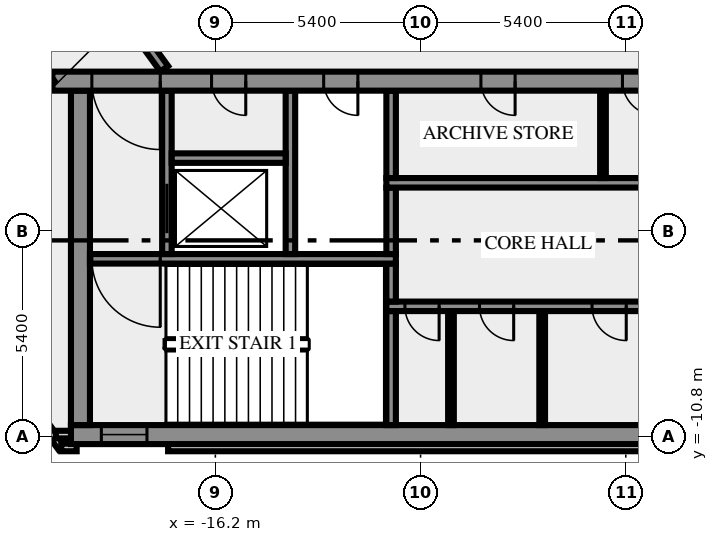
"""IFC4 building model, lengths in metres.
Left out: names, types, materials, properties, quantities, classifications, styles, units other than length and angle.
Written with IfcOpenShell. Run it as: python <this file> out.ifc"""

import sys

from ifc_helpers import new_model, si_unit, direction, frame, frame_2d, origin, place, context, subcontext, project, spatial, rectangle, extrude, element, fill, save


model = new_model("IFC4")
c1 = context("Model", 3, precision=1e-05, world=origin(), true_north=direction((0.0, 1.0)))
c2 = subcontext(c1, "Body", "Model", "MODEL_VIEW")
j1 = project(units=[si_unit("LENGTHUNIT", "METRE"), si_unit("PLANEANGLEUNIT", "RADIAN")], contexts=[c1])
p1 = place(None, origin())
s1 = spatial("IfcSite", under=j1, at=p1, CompositionType="ELEMENT")
p2 = place(p1, origin())
s2 = spatial("IfcBuilding", under=s1, at=p2, CompositionType="ELEMENT")
p3 = place(p2, frame((0.0, 0.0, 156.0)))
s3 = spatial("IfcBuildingStorey", under=s2, at=p3, CompositionType="ELEMENT", Elevation=156.0)
p4 = place(p3, frame((-21.833, -8.909, 0.0), z_axis=(0.0, 0.0, 1.0), x_axis=(0.587766567315, -0.809030569476, 0.0)))
e1 = element("IfcWall", 1, at=p4, inside=s3, PredefinedType="SOLIDWALL", context=c2, shape_type="SweptSolid", body=[
    extrude(rectangle(XDim=2.688, YDim=0.2, at=frame_2d((1.344, 0.0))), origin(), (0.0, 0.0, 1.0), 3.65),
])
p5 = place(p3, frame((-20.256, -11.088, 0.0), z_axis=(0.0, 0.0, 1.0), x_axis=(1.0, 0.0, 0.0)))
e2 = element("IfcWall", 2, at=p5, inside=s3, PredefinedType="SOLIDWALL", context=c2, shape_type="SweptSolid", body=[
    extrude(rectangle(XDim=0.406, YDim=0.2, at=frame_2d((0.203, 0.0))), origin(), (0.0, 0.0, 1.0), 3.65),
])
p6 = place(p3, frame((-17.444, -11.088, 0.0), z_axis=(0.0, 0.0, 1.0), x_axis=(1.0, 0.0, 0.0)))
e3 = element("IfcWall", 3, at=p6, inside=s3, PredefinedType="SOLIDWALL", context=c2, shape_type="SweptSolid", body=[
    extrude(rectangle(XDim=34.888, YDim=0.2, at=frame_2d((17.444, 0.0))), origin(), (0.0, 0.0, 1.0), 3.65),
])
p7 = place(p3, frame((-19.98, -10.75, 0.0), z_axis=(0.0, 0.0, 1.0), x_axis=(-1.0, 0.0, 0.0)))
e4 = element("IfcWall", 4, at=p7, inside=s3, PredefinedType="SOLIDWALL", context=c2, shape_type="SweptSolid", body=[
    extrude(rectangle(XDim=0.417, YDim=0.2, at=frame_2d((0.208, 0.0))), origin(), (0.0, 0.0, 1.0), 3.65),
])
p8 = place(p3, frame((-20.0, -10.75, 0.0), z_axis=(0.0, 0.0, 1.0), x_axis=(1.0, 0.0, 0.0)))
e5 = element("IfcWall", 5, at=p8, inside=s3, PredefinedType="SHEAR", context=c2, shape_type="SweptSolid", body=[
    extrude(rectangle(XDim=40.0, YDim=0.5, at=frame_2d((20.0, 0.0))), origin(), (0.0, 0.0, 1.0), 3.65),
])
p9 = place(p8, frame((0.8, 0.0, 1.0)))
e6 = element("IfcOpeningElement", 6, at=p9, cuts=e5, PredefinedType="OPENING", context=c2, shape_type="SweptSolid", body=[
    extrude(rectangle(XDim=1.2, YDim=1.2, at=frame_2d((0.6, 0.6))), frame((0.0, 0.26, 0.0), z_axis=(0.0, -1.0, 0.0), x_axis=(1.0, 0.0, 0.0)), (0.0, 0.0, 1.0), 0.52),
])
p10 = place(p8, frame((38.0, 0.0, 1.0)))
e7 = element("IfcOpeningElement", 7, at=p10, cuts=e5, PredefinedType="OPENING", context=c2, shape_type="SweptSolid", body=[
    extrude(rectangle(XDim=1.2, YDim=1.2, at=frame_2d((0.6, 0.6))), frame((0.0, 0.26, 0.0), z_axis=(0.0, -1.0, 0.0), x_axis=(1.0, 0.0, 0.0)), (0.0, 0.0, 1.0), 0.52),
])
p11 = place(p3, frame((-19.75, -10.5, 0.0), z_axis=(0.0, 0.0, 1.0), x_axis=(0.0, 1.0, 0.0)))
e8 = element("IfcWall", 8, at=p11, inside=s3, PredefinedType="SHEAR", context=c2, shape_type="SweptSolid", body=[
    extrude(rectangle(XDim=8.8, YDim=0.5, at=frame_2d((4.4, 0.0))), origin(), (0.0, 0.0, 1.0), 3.65),
])
p12 = place(p3, frame((-11.575, -10.5, 0.0), z_axis=(0.0, 0.0, 1.0), x_axis=(0.0, 1.0, 0.0)))
e9 = element("IfcWall", 9, at=p12, inside=s3, PredefinedType="SHEAR", context=c2, shape_type="SweptSolid", body=[
    extrude(rectangle(XDim=3.0, YDim=0.25, at=frame_2d((1.5, 0.0))), origin(), (0.0, 0.0, 1.0), 3.65),
])
for number, where, z_axis, x_axis in (
    (10, (-10.0, -10.5, 0.0), (0.0, 0.0, 1.0), (0.0, 1.0, 0.0)),
    (11, (-7.6, -10.5, 0.0), (0.0, 0.0, 1.0), (0.0, 1.0, 0.0)),
):
    element("IfcWall", number, at=place(p3, frame(where, z_axis=z_axis, x_axis=x_axis)), inside=s3, PredefinedType="PARTITIONING", context=c2, shape_type="SweptSolid", body=[
        extrude(rectangle(XDim=3.0, YDim=0.15, at=frame_2d((1.5, 0.0))), origin(), (0.0, 0.0, 1.0), 3.65),
    ])
p13 = place(p3, frame((11.7, -7.375, 0.0), z_axis=(0.0, 0.0, 1.0), x_axis=(-1.0, 0.0, 0.0)))
e12 = element("IfcWall", 12, at=p13, inside=s3, PredefinedType="SHEAR", context=c2, shape_type="SweptSolid", body=[
    extrude(rectangle(XDim=23.4, YDim=0.25, at=frame_2d((11.7, 0.0))), origin(), (0.0, 0.0, 1.0), 3.65),
])
p14 = place(p13, frame((22.012, 0.0, 0.0)))
e13 = element("IfcOpeningElement", 13, at=p14, cuts=e12, PredefinedType="OPENING", context=c2, shape_type="SweptSolid", body=[
    extrude(rectangle(XDim=0.9, YDim=2.1, at=frame_2d((0.45, 1.05))), frame((0.0, 0.135, 0.0), z_axis=(0.0, -1.0, 0.0), x_axis=(1.0, 0.0, 0.0)), (0.0, 0.0, 1.0), 0.27),
])
p15 = place(p13, frame((20.05, 0.0, 0.0)))
e14 = element("IfcOpeningElement", 14, at=p15, cuts=e12, PredefinedType="OPENING", context=c2, shape_type="SweptSolid", body=[
    extrude(rectangle(XDim=0.9, YDim=2.1, at=frame_2d((0.45, 1.05))), frame((0.0, 0.135, 0.0), z_axis=(0.0, -1.0, 0.0), x_axis=(1.0, 0.0, 0.0)), (0.0, 0.0, 1.0), 0.27),
])
p16 = place(p13, frame((17.088, 0.0, 0.0)))
e15 = element("IfcOpeningElement", 15, at=p16, cuts=e12, PredefinedType="OPENING", context=c2, shape_type="SweptSolid", body=[
    extrude(rectangle(XDim=0.9, YDim=2.1, at=frame_2d((0.45, 1.05))), frame((0.0, 0.135, 0.0), z_axis=(0.0, -1.0, 0.0), x_axis=(1.0, 0.0, 0.0)), (0.0, 0.0, 1.0), 0.27),
])
p17 = place(p13, frame((14.45, 0.0, 0.0)))
e16 = element("IfcOpeningElement", 16, at=p17, cuts=e12, PredefinedType="OPENING", context=c2, shape_type="SweptSolid", body=[
    extrude(rectangle(XDim=0.9, YDim=2.1, at=frame_2d((0.45, 1.05))), frame((0.0, 0.135, 0.0), z_axis=(0.0, -1.0, 0.0), x_axis=(1.0, 0.0, 0.0)), (0.0, 0.0, 1.0), 0.27),
])
p18 = place(p13, frame((12.95, 0.0, 0.0)))
e17 = element("IfcOpeningElement", 17, at=p18, cuts=e12, PredefinedType="OPENING", context=c2, shape_type="SweptSolid", body=[
    extrude(rectangle(XDim=0.9, YDim=2.1, at=frame_2d((0.45, 1.05))), frame((0.0, 0.135, 0.0), z_axis=(0.0, -1.0, 0.0), x_axis=(1.0, 0.0, 0.0)), (0.0, 0.0, 1.0), 0.27),
])
p19 = place(p13, frame((11.475, 0.0, 0.0)))
e18 = element("IfcOpeningElement", 18, at=p19, cuts=e12, PredefinedType="OPENING", context=c2, shape_type="SweptSolid", body=[
    extrude(rectangle(XDim=0.9, YDim=2.1, at=frame_2d((0.45, 1.05))), frame((0.0, 0.135, 0.0), z_axis=(0.0, -1.0, 0.0), x_axis=(1.0, 0.0, 0.0)), (0.0, 0.0, 1.0), 0.27),
])
p20 = place(p13, frame((10.45, 0.0, 0.0)))
e19 = element("IfcOpeningElement", 19, at=p20, cuts=e12, PredefinedType="OPENING", context=c2, shape_type="SweptSolid", body=[
    extrude(rectangle(XDim=0.5, YDim=2.1, at=frame_2d((0.25, 1.05))), frame((0.0, 0.135, 0.0), z_axis=(0.0, -1.0, 0.0), x_axis=(1.0, 0.0, 0.0)), (0.0, 0.0, 1.0), 0.27),
])
p21 = place(p13, frame((8.35, 0.0, 0.0)))
e20 = element("IfcOpeningElement", 20, at=p21, cuts=e12, PredefinedType="OPENING", context=c2, shape_type="SweptSolid", body=[
    extrude(rectangle(XDim=1.1, YDim=2.1, at=frame_2d((0.55, 1.05))), frame((0.0, 0.135, 0.0), z_axis=(0.0, -1.0, 0.0), x_axis=(1.0, 0.0, 0.0)), (0.0, 0.0, 1.0), 0.27),
])
p22 = place(p13, frame((5.85, 0.0, 0.0)))
e21 = element("IfcOpeningElement", 21, at=p22, cuts=e12, PredefinedType="OPENING", context=c2, shape_type="SweptSolid", body=[
    extrude(rectangle(XDim=1.1, YDim=2.1, at=frame_2d((0.55, 1.05))), frame((0.0, 0.135, 0.0), z_axis=(0.0, -1.0, 0.0), x_axis=(1.0, 0.0, 0.0)), (0.0, 0.0, 1.0), 0.27),
])
p23 = place(p13, frame((3.35, 0.0, 0.0)))
e22 = element("IfcOpeningElement", 22, at=p23, cuts=e12, PredefinedType="OPENING", context=c2, shape_type="SweptSolid", body=[
    extrude(rectangle(XDim=1.1, YDim=2.1, at=frame_2d((0.55, 1.05))), frame((0.0, 0.135, 0.0), z_axis=(0.0, -1.0, 0.0), x_axis=(1.0, 0.0, 0.0)), (0.0, 0.0, 1.0), 0.27),
])
p24 = place(p13, frame((0.85, 0.0, 0.0)))
e23 = element("IfcOpeningElement", 23, at=p24, cuts=e12, PredefinedType="OPENING", context=c2, shape_type="SweptSolid", body=[
    extrude(rectangle(XDim=1.1, YDim=2.1, at=frame_2d((0.55, 1.05))), frame((0.0, 0.135, 0.0), z_axis=(0.0, -1.0, 0.0), x_axis=(1.0, 0.0, 0.0)), (0.0, 0.0, 1.0), 0.27),
])
p25 = place(p3, frame((-11.575, -7.25, 0.0), z_axis=(0.0, 0.0, 1.0), x_axis=(0.0, 1.0, 0.0)))
e24 = element("IfcWall", 24, at=p25, inside=s3, PredefinedType="SHEAR", context=c2, shape_type="SweptSolid", body=[
    extrude(rectangle(XDim=1.0, YDim=0.25, at=frame_2d((0.5, 0.0))), origin(), (0.0, 0.0, 1.0), 3.65),
])
p26 = place(p3, frame((-11.45, -6.125, 0.0), z_axis=(0.0, 0.0, 1.0), x_axis=(-1.0, 0.0, 0.0)))
e25 = element("IfcWall", 25, at=p26, inside=s3, PredefinedType="SHEAR", context=c2, shape_type="SweptSolid", body=[
    extrude(rectangle(XDim=8.05, YDim=0.25, at=frame_2d((4.025, 0.0))), origin(), (0.0, 0.0, 1.0), 3.65),
])
p27 = place(p26, frame((6.2, 0.0, 0.0)))
e26 = element("IfcOpeningElement", 26, at=p27, cuts=e25, PredefinedType="OPENING", context=c2, shape_type="SweptSolid", body=[
    extrude(rectangle(XDim=1.8, YDim=2.1, at=frame_2d((0.9, 1.05))), frame((0.0, 0.135, 0.0), z_axis=(0.0, -1.0, 0.0), x_axis=(1.0, 0.0, 0.0)), (0.0, 0.0, 1.0), 0.27),
])
p28 = place(p3, frame((-17.475, -6.0, 0.0), z_axis=(0.0, 0.0, 1.0), x_axis=(0.0, 1.0, 0.0)))
e27 = element("IfcWall", 27, at=p28, inside=s3, PredefinedType="SHEAR", context=c2, shape_type="SweptSolid", body=[
    extrude(rectangle(XDim=4.3, YDim=0.25, at=frame_2d((2.15, 0.0))), origin(), (0.0, 0.0, 1.0), 3.65),
])
p29 = place(p28, frame((0.55, 0.0, 0.0)))
e28 = element("IfcOpeningElement", 28, at=p29, cuts=e27, PredefinedType="OPENING", context=c2, shape_type="SweptSolid", body=[
    extrude(rectangle(XDim=1.3, YDim=2.1, at=frame_2d((0.65, 1.05))), frame((0.0, 0.135, 0.0), z_axis=(0.0, -1.0, 0.0), x_axis=(1.0, 0.0, 0.0)), (0.0, 0.0, 1.0), 0.27),
])
p30 = place(p3, frame((-14.225, -6.0, 0.0), z_axis=(0.0, 0.0, 1.0), x_axis=(0.0, 1.0, 0.0)))
e29 = element("IfcWall", 29, at=p30, inside=s3, PredefinedType="SHEAR", context=c2, shape_type="SweptSolid", body=[
    extrude(rectangle(XDim=4.3, YDim=0.25, at=frame_2d((2.15, 0.0))), origin(), (0.0, 0.0, 1.0), 3.65),
])
p31 = place(p3, frame((-11.575, -6.0, 0.0), z_axis=(0.0, 0.0, 1.0), x_axis=(0.0, 1.0, 0.0)))
e30 = element("IfcWall", 30, at=p31, inside=s3, PredefinedType="SHEAR", context=c2, shape_type="SweptSolid", body=[
    extrude(rectangle(XDim=1.75, YDim=0.25, at=frame_2d((0.875, 0.0))), origin(), (0.0, 0.0, 1.0), 3.65),
])
p32 = place(p3, frame((-11.7, -4.125, 0.0), z_axis=(0.0, 0.0, 1.0), x_axis=(1.0, 0.0, 0.0)))
e31 = element("IfcWall", 31, at=p32, inside=s3, PredefinedType="SHEAR", context=c2, shape_type="SweptSolid", body=[
    extrude(rectangle(XDim=7.75, YDim=0.25, at=frame_2d((3.875, 0.0))), origin(), (0.0, 0.0, 1.0), 3.65),
])
p33 = place(p3, frame((-11.575, -4.0, 0.0), z_axis=(0.0, 0.0, 1.0), x_axis=(0.0, 1.0, 0.0)))
e32 = element("IfcWall", 32, at=p33, inside=s3, PredefinedType="SHEAR", context=c2, shape_type="SweptSolid", body=[
    extrude(rectangle(XDim=2.3, YDim=0.25, at=frame_2d((1.15, 0.0))), origin(), (0.0, 0.0, 1.0), 3.65),
])
p34 = place(p3, frame((-6.0, -4.0, 0.0), z_axis=(0.0, 0.0, 1.0), x_axis=(0.0, 1.0, 0.0)))
e33 = element("IfcWall", 33, at=p34, inside=s3, PredefinedType="PARTITIONING", context=c2, shape_type="SweptSolid", body=[
    extrude(rectangle(XDim=2.3, YDim=0.15, at=frame_2d((1.15, 0.0))), origin(), (0.0, 0.0, 1.0), 3.65),
])
p35 = place(p3, frame((-17.35, -3.475, 0.0), z_axis=(0.0, 0.0, 1.0), x_axis=(1.0, 0.0, 0.0)))
e34 = element("IfcWall", 34, at=p35, inside=s3, PredefinedType="SHEAR", context=c2, shape_type="SweptSolid", body=[
    extrude(rectangle(XDim=3.0, YDim=0.25, at=frame_2d((1.5, 0.0))), origin(), (0.0, 0.0, 1.0), 3.65),
])
p36 = place(p3, frame((20.49, -1.45, 0.0), z_axis=(0.0, 0.0, 1.0), x_axis=(-1.0, 0.0, 0.0)))
e35 = element("IfcWall", 35, at=p36, inside=s3, PredefinedType="SHEAR", context=c2, shape_type="SweptSolid", body=[
    extrude(rectangle(XDim=40.98, YDim=0.5, at=frame_2d((20.49, 0.0))), origin(), (0.0, 0.0, 1.0), 3.65),
])
p37 = place(p36, frame((38.14, 0.0, 0.0)))
e36 = element("IfcOpeningElement", 36, at=p37, cuts=e35, PredefinedType="OPENING", context=c2, shape_type="SweptSolid", body=[
    extrude(rectangle(XDim=1.8, YDim=2.1, at=frame_2d((0.9, 1.05))), frame((0.0, 0.26, 0.0), z_axis=(0.0, -1.0, 0.0), x_axis=(1.0, 0.0, 0.0)), (0.0, 0.0, 1.0), 0.52),
])
p38 = place(p36, frame((35.89, 0.0, 0.0)))
e37 = element("IfcOpeningElement", 37, at=p38, cuts=e35, PredefinedType="OPENING", context=c2, shape_type="SweptSolid", body=[
    extrude(rectangle(XDim=0.9, YDim=2.1, at=frame_2d((0.45, 1.05))), frame((0.0, 0.26, 0.0), z_axis=(0.0, -1.0, 0.0), x_axis=(1.0, 0.0, 0.0)), (0.0, 0.0, 1.0), 0.52),
])
p39 = place(p36, frame((32.94, 0.0, 0.0)))
e38 = element("IfcOpeningElement", 38, at=p39, cuts=e35, PredefinedType="OPENING", context=c2, shape_type="SweptSolid", body=[
    extrude(rectangle(XDim=0.9, YDim=2.1, at=frame_2d((0.45, 1.05))), frame((0.0, 0.26, 0.0), z_axis=(0.0, -1.0, 0.0), x_axis=(1.0, 0.0, 0.0)), (0.0, 0.0, 1.0), 0.52),
])
p40 = place(p36, frame((28.802, 0.0, 0.0)))
e39 = element("IfcOpeningElement", 39, at=p40, cuts=e35, PredefinedType="OPENING", context=c2, shape_type="SweptSolid", body=[
    extrude(rectangle(XDim=0.9, YDim=2.1, at=frame_2d((0.45, 1.05))), frame((0.0, 0.26, 0.0), z_axis=(0.0, -1.0, 0.0), x_axis=(1.0, 0.0, 0.0)), (0.0, 0.0, 1.0), 0.52),
])
p41 = place(p36, frame((25.077, 0.0, 0.0)))
e40 = element("IfcOpeningElement", 40, at=p41, cuts=e35, PredefinedType="OPENING", context=c2, shape_type="SweptSolid", body=[
    extrude(rectangle(XDim=0.9, YDim=2.1, at=frame_2d((0.45, 1.05))), frame((0.0, 0.26, 0.0), z_axis=(0.0, -1.0, 0.0), x_axis=(1.0, 0.0, 0.0)), (0.0, 0.0, 1.0), 0.52),
])
p42 = place(p36, frame((21.765, 0.0, 0.0)))
e41 = element("IfcOpeningElement", 41, at=p42, cuts=e35, PredefinedType="OPENING", context=c2, shape_type="SweptSolid", body=[
    extrude(rectangle(XDim=2.0, YDim=2.1, at=frame_2d((1.0, 1.05))), frame((0.0, 0.26, 0.0), z_axis=(0.0, -1.0, 0.0), x_axis=(1.0, 0.0, 0.0)), (0.0, 0.0, 1.0), 0.52),
])
p43 = place(p36, frame((7.14, 0.0, 0.0)))
e42 = element("IfcOpeningElement", 42, at=p43, cuts=e35, PredefinedType="OPENING", context=c2, shape_type="SweptSolid", body=[
    extrude(rectangle(XDim=0.9, YDim=2.1, at=frame_2d((0.45, 1.05))), frame((0.0, 0.26, 0.0), z_axis=(0.0, -1.0, 0.0), x_axis=(1.0, 0.0, 0.0)), (0.0, 0.0, 1.0), 0.52),
])
p44 = place(p36, frame((5.028, 0.0, 0.0)))
e43 = element("IfcOpeningElement", 43, at=p44, cuts=e35, PredefinedType="OPENING", context=c2, shape_type="SweptSolid", body=[
    extrude(rectangle(XDim=0.8, YDim=2.1, at=frame_2d((0.4, 1.05))), frame((0.0, 0.26, 0.0), z_axis=(0.0, -1.0, 0.0), x_axis=(1.0, 0.0, 0.0)), (0.0, 0.0, 1.0), 0.52),
])
p45 = place(p36, frame((3.452, 0.0, 0.0)))
e44 = element("IfcOpeningElement", 44, at=p45, cuts=e35, PredefinedType="OPENING", context=c2, shape_type="SweptSolid", body=[
    extrude(rectangle(XDim=0.8, YDim=2.1, at=frame_2d((0.4, 1.05))), frame((0.0, 0.26, 0.0), z_axis=(0.0, -1.0, 0.0), x_axis=(1.0, 0.0, 0.0)), (0.0, 0.0, 1.0), 0.52),
])
p46 = place(p36, frame((1.04, 0.0, 0.0)))
e45 = element("IfcOpeningElement", 45, at=p46, cuts=e35, PredefinedType="OPENING", context=c2, shape_type="SweptSolid", body=[
    extrude(rectangle(XDim=1.8, YDim=2.1, at=frame_2d((0.9, 1.05))), frame((0.0, 0.26, 0.0), z_axis=(0.0, -1.0, 0.0), x_axis=(1.0, 0.0, 0.0)), (0.0, 0.0, 1.0), 0.52),
])
p47 = place(p3, frame((-20.531, -1.523, 0.0), z_axis=(0.0, 0.0, 1.0), x_axis=(-0.587781654618, 0.809019608226, 0.0)))
e46 = element("IfcWall", 46, at=p47, inside=s3, PredefinedType="SOLIDWALL", context=c2, shape_type="SweptSolid", body=[
    extrude(rectangle(XDim=33.911, YDim=0.25, at=frame_2d((16.956, 0.0))), origin(), (0.0, 0.0, 1.0), 3.65),
])
p48 = place(p47, frame((19.743, 0.0, 0.0)))
e47 = element("IfcOpeningElement", 47, at=p48, cuts=e46, PredefinedType="OPENING", context=c2, shape_type="SweptSolid", body=[
    extrude(rectangle(XDim=1.8, YDim=2.1, at=frame_2d((0.9, 1.05))), frame((0.0, 0.135, 0.0), z_axis=(0.0, -1.0, 0.0), x_axis=(1.0, 0.0, 0.0)), (0.0, 0.0, 1.0), 0.27),
])
p49 = place(p47, frame((0.533, 0.0, 0.0)))
e48 = element("IfcOpeningElement", 48, at=p49, cuts=e46, PredefinedType="OPENING", context=c2, shape_type="SweptSolid", body=[
    extrude(rectangle(XDim=0.9, YDim=2.1, at=frame_2d((0.45, 1.05))), frame((0.0, 0.135, 0.0), z_axis=(0.0, -1.0, 0.0), x_axis=(1.0, 0.0, 0.0)), (0.0, 0.0, 1.0), 0.27),
])
p50 = place(p3, frame((-38.32, 27.469, 0.0), z_axis=(0.0, 0.0, 1.0), x_axis=(0.587788021768, -0.809014982226, 0.0)))
e49 = element("IfcWall", 49, at=p50, inside=s3, PredefinedType="SOLIDWALL", context=c2, shape_type="SweptSolid", body=[
    extrude(rectangle(XDim=35.344, YDim=0.25, at=frame_2d((17.672, 0.0))), origin(), (0.0, 0.0, 1.0), 3.65),
])
p51 = place(p50, frame((31.003, 0.0, 0.0)))
e50 = element("IfcOpeningElement", 50, at=p51, cuts=e49, PredefinedType="OPENING", context=c2, shape_type="SweptSolid", body=[
    extrude(rectangle(XDim=0.9, YDim=2.1, at=frame_2d((0.45, 1.05))), frame((0.0, 0.135, 0.0), z_axis=(0.0, -1.0, 0.0), x_axis=(1.0, 0.0, 0.0)), (0.0, 0.0, 1.0), 0.27),
])
p52 = place(p50, frame((16.687, 0.0, 0.0)))
e51 = element("IfcOpeningElement", 51, at=p52, cuts=e49, PredefinedType="OPENING", context=c2, shape_type="SweptSolid", body=[
    extrude(rectangle(XDim=0.9, YDim=2.1, at=frame_2d((0.45, 1.05))), frame((0.0, 0.135, 0.0), z_axis=(0.0, -1.0, 0.0), x_axis=(1.0, 0.0, 0.0)), (0.0, 0.0, 1.0), 0.27),
])
p53 = place(p9, origin())
e52 = element("IfcWindow", 52, at=p53, inside=s3, PartitioningType="SINGLE_PANEL", PredefinedType="WINDOW", context=c2, shape_type="SweptSolid", body=[
    extrude(rectangle(XDim=1.2, YDim=1.2, at=frame_2d((0.6, 0.6))), frame((0.0, 0.03, 0.0), z_axis=(0.0, -1.0, 0.0), x_axis=(1.0, 0.0, 0.0)), (0.0, 0.0, 1.0), 0.06),
])
fill(e6, e52)
p54 = place(p14, origin())
e53 = element("IfcDoor", 53, at=p54, inside=s3, OperationType="SINGLE_SWING_RIGHT", PredefinedType="DOOR", context=c2, shape_type="SweptSolid", body=[
    extrude(rectangle(XDim=0.9, YDim=2.1, at=frame_2d((0.45, 1.05))), frame((0.0, 0.025, 0.0), z_axis=(0.0, -1.0, 0.0), x_axis=(1.0, 0.0, 0.0)), (0.0, 0.0, 1.0), 0.05),
])
fill(e13, e53)
p55 = place(p15, origin())
e54 = element("IfcDoor", 54, at=p55, inside=s3, OperationType="SINGLE_SWING_RIGHT", PredefinedType="DOOR", context=c2, shape_type="SweptSolid", body=[
    extrude(rectangle(XDim=0.9, YDim=2.1, at=frame_2d((0.45, 1.05))), frame((0.0, 0.025, 0.0), z_axis=(0.0, -1.0, 0.0), x_axis=(1.0, 0.0, 0.0)), (0.0, 0.0, 1.0), 0.05),
])
fill(e14, e54)
p56 = place(p16, origin())
e55 = element("IfcDoor", 55, at=p56, inside=s3, OperationType="SINGLE_SWING_RIGHT", PredefinedType="DOOR", context=c2, shape_type="SweptSolid", body=[
    extrude(rectangle(XDim=0.9, YDim=2.1, at=frame_2d((0.45, 1.05))), frame((0.0, 0.025, 0.0), z_axis=(0.0, -1.0, 0.0), x_axis=(1.0, 0.0, 0.0)), (0.0, 0.0, 1.0), 0.05),
])
fill(e15, e55)
p57 = place(p27, origin())
e56 = element("IfcDoor", 56, at=p57, inside=s3, OperationType="DOUBLE_DOOR_SINGLE_SWING", PredefinedType="DOOR", context=c2, shape_type="SweptSolid", body=[
    extrude(rectangle(XDim=1.8, YDim=2.1, at=frame_2d((0.9, 1.05))), frame((0.0, 0.025, 0.0), z_axis=(0.0, -1.0, 0.0), x_axis=(1.0, 0.0, 0.0)), (0.0, 0.0, 1.0), 0.05),
])
fill(e26, e56)
p58 = place(p29, origin())
e57 = element("IfcDoor", 57, at=p58, inside=s3, OperationType="DOUBLE_DOOR_SLIDING", PredefinedType="DOOR", context=c2, shape_type="SweptSolid", body=[
    extrude(rectangle(XDim=1.3, YDim=2.1, at=frame_2d((0.65, 1.05))), frame((0.0, 0.025, 0.0), z_axis=(0.0, -1.0, 0.0), x_axis=(1.0, 0.0, 0.0)), (0.0, 0.0, 1.0), 0.05),
])
fill(e28, e57)
p59 = place(p37, origin())
e58 = element("IfcDoor", 58, at=p59, inside=s3, OperationType="DOUBLE_DOOR_SINGLE_SWING", PredefinedType="DOOR", context=c2, shape_type="SweptSolid", body=[
    extrude(rectangle(XDim=1.8, YDim=2.1, at=frame_2d((0.9, 1.05))), frame((0.0, 0.025, 0.0), z_axis=(0.0, -1.0, 0.0), x_axis=(1.0, 0.0, 0.0)), (0.0, 0.0, 1.0), 0.05),
])
fill(e36, e58)
p60 = place(p38, origin())
e59 = element("IfcDoor", 59, at=p60, inside=s3, OperationType="SINGLE_SWING_RIGHT", PredefinedType="DOOR", context=c2, shape_type="SweptSolid", body=[
    extrude(rectangle(XDim=0.9, YDim=2.1, at=frame_2d((0.45, 1.05))), frame((0.0, 0.025, 0.0), z_axis=(0.0, -1.0, 0.0), x_axis=(1.0, 0.0, 0.0)), (0.0, 0.0, 1.0), 0.05),
])
fill(e37, e59)
p61 = place(p39, origin())
e60 = element("IfcDoor", 60, at=p61, inside=s3, OperationType="SINGLE_SWING_RIGHT", PredefinedType="DOOR", context=c2, shape_type="SweptSolid", body=[
    extrude(rectangle(XDim=0.9, YDim=2.1, at=frame_2d((0.45, 1.05))), frame((0.0, 0.025, 0.0), z_axis=(0.0, -1.0, 0.0), x_axis=(1.0, 0.0, 0.0)), (0.0, 0.0, 1.0), 0.05),
])
fill(e38, e60)
p62 = place(p40, origin())
e61 = element("IfcDoor", 61, at=p62, inside=s3, OperationType="SINGLE_SWING_RIGHT", PredefinedType="DOOR", context=c2, shape_type="SweptSolid", body=[
    extrude(rectangle(XDim=0.9, YDim=2.1, at=frame_2d((0.45, 1.05))), frame((0.0, 0.025, 0.0), z_axis=(0.0, -1.0, 0.0), x_axis=(1.0, 0.0, 0.0)), (0.0, 0.0, 1.0), 0.05),
])
fill(e39, e61)
p63 = place(p41, origin())
e62 = element("IfcDoor", 62, at=p63, inside=s3, OperationType="SINGLE_SWING_RIGHT", PredefinedType="DOOR", context=c2, shape_type="SweptSolid", body=[
    extrude(rectangle(XDim=0.9, YDim=2.1, at=frame_2d((0.45, 1.05))), frame((0.0, 0.025, 0.0), z_axis=(0.0, -1.0, 0.0), x_axis=(1.0, 0.0, 0.0)), (0.0, 0.0, 1.0), 0.05),
])
fill(e40, e62)
save(model, sys.argv[1])
